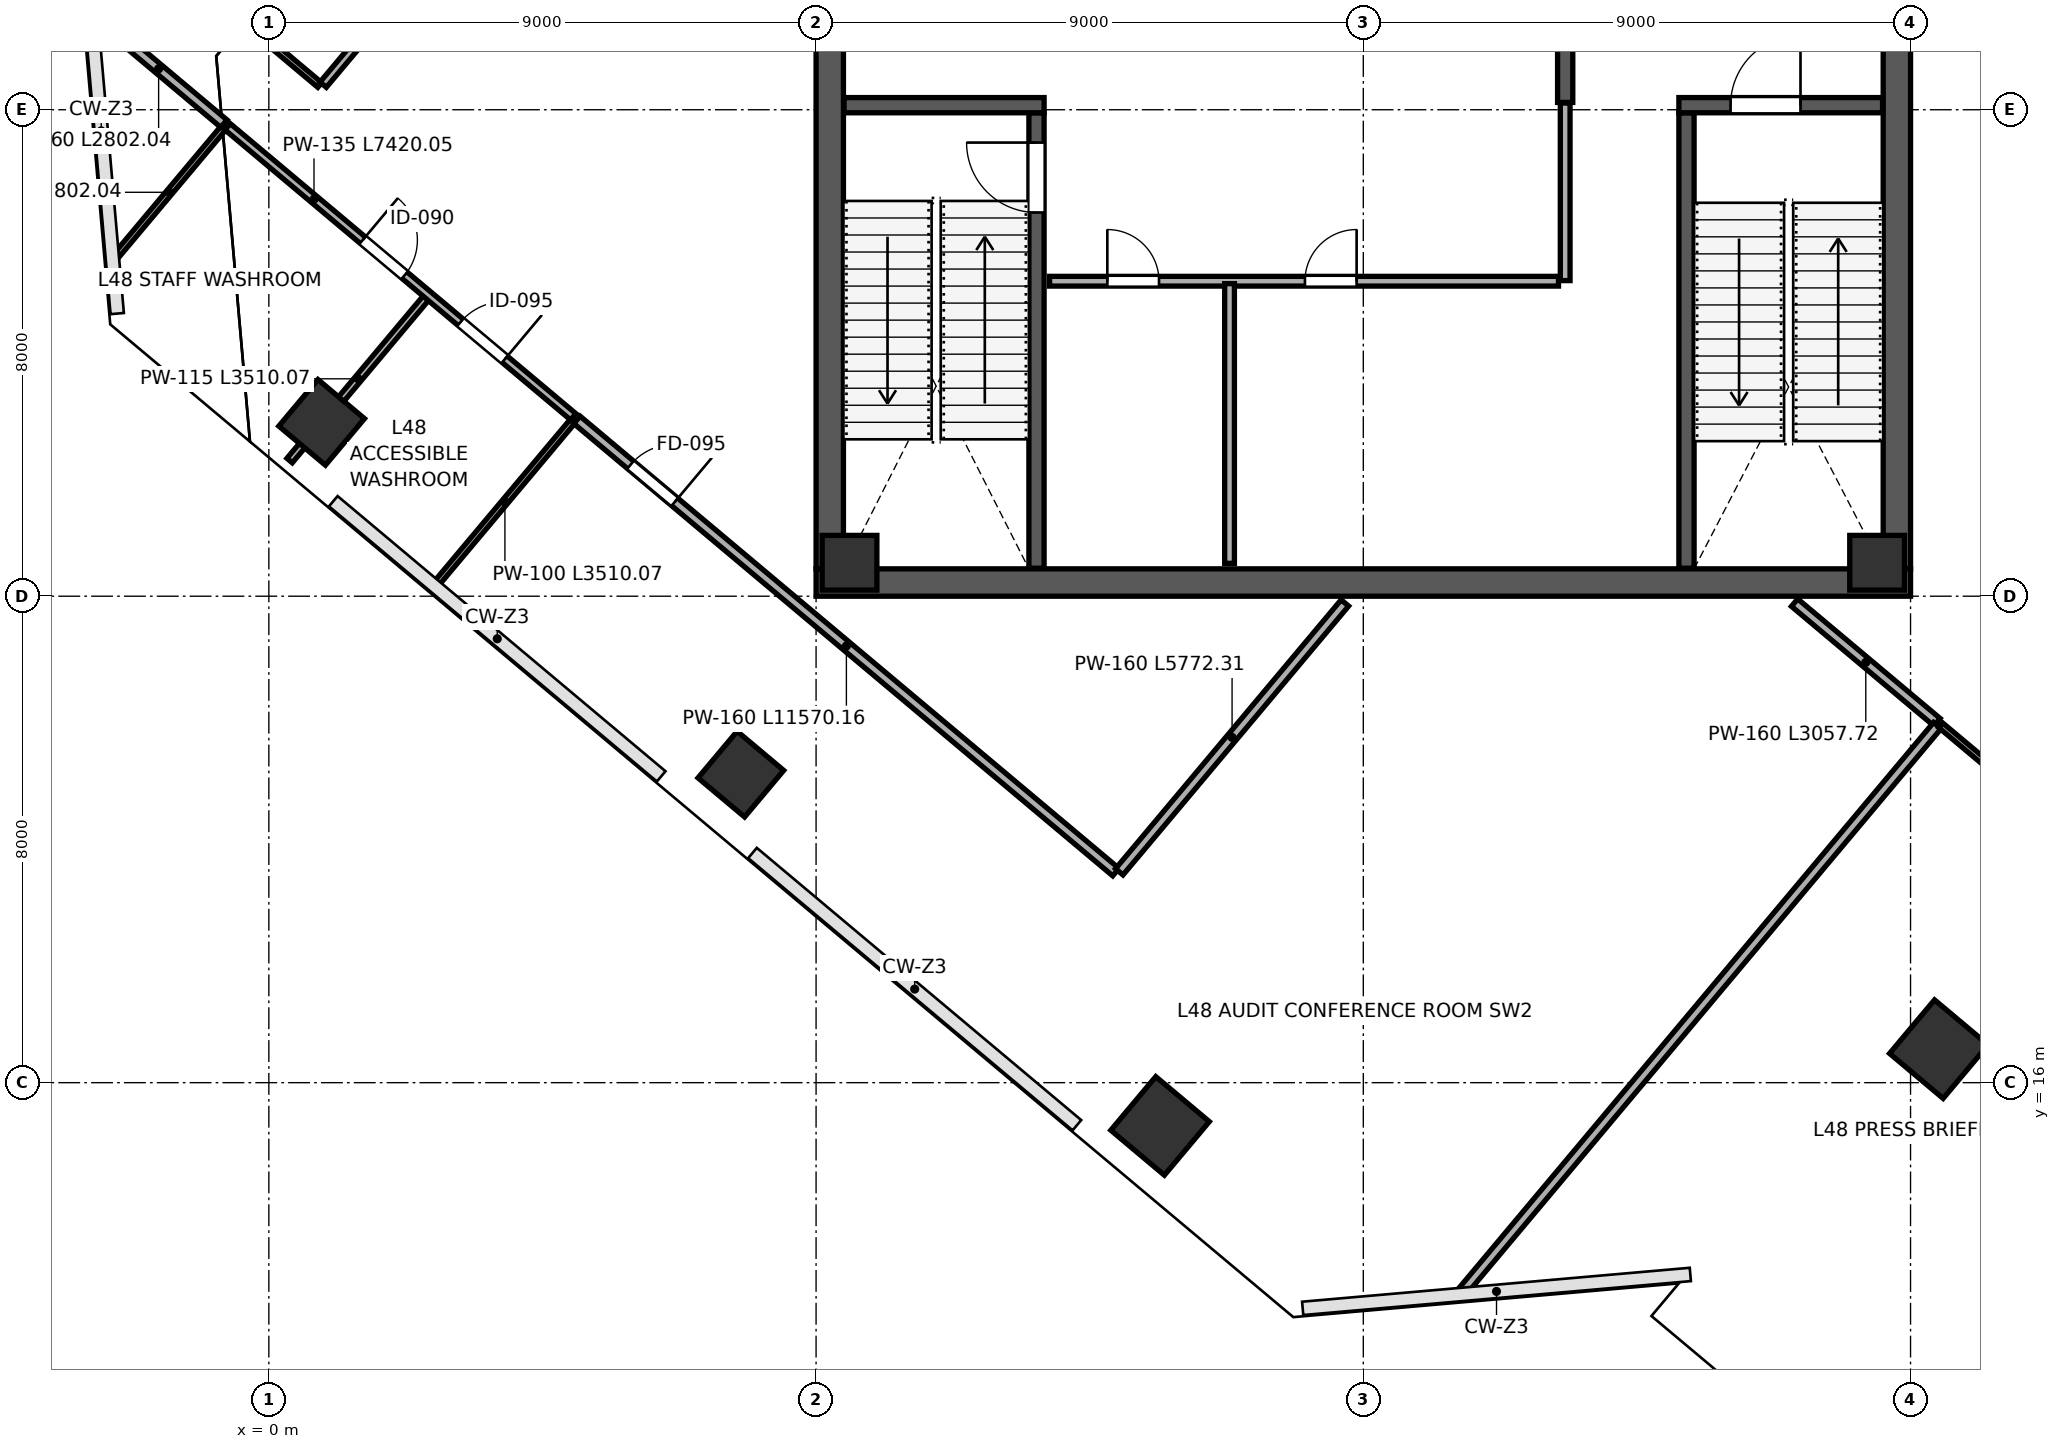
"""IFC4 building model, lengths in metres.
Left out: names, types, materials, properties, quantities, classifications, styles, units other than length and angle.
Written with IfcOpenShell. Run it as: python <this file> out.ifc"""

import sys

from ifc_helpers import new_model, si_unit, direction, frame, frame_2d, origin, origin_2d, place, context, subcontext, project, spatial, rectangle, extrude, source, transform, mapped, element, fill, save


model = new_model("IFC4")
c1 = context("Model", 3, precision=1e-05, world=origin(), true_north=direction((0.0, 1.0)))
c2 = subcontext(c1, "Body", "Model", "MODEL_VIEW")
j1 = project(units=[si_unit("LENGTHUNIT", "METRE"), si_unit("PLANEANGLEUNIT", "RADIAN")], contexts=[c1])
p1 = place(None, origin())
s1 = spatial("IfcSite", under=j1, at=p1, CompositionType="ELEMENT")
p2 = place(p1, origin())
s2 = spatial("IfcBuilding", under=s1, at=p2, CompositionType="ELEMENT")
p3 = place(p2, frame((0.0, 0.0, 215.2)))
s3 = spatial("IfcBuildingStorey", under=s2, at=p3, CompositionType="ELEMENT", Elevation=215.2)
m1 = source(origin(), c2, "Body", "SweptSolid", [
    extrude(rectangle(XDim=0.9, YDim=0.9, at=origin_2d()), origin(), (0.0, 0.0, 1.0), 5.399),
])
for number, where, z_axis, x_axis in (
    (1, (9.55, 24.55, 0.001), (0.0, 0.0, 1.0), (1.0, 0.0, 0.0)),
    (2, (26.45, 24.55, 0.001), (0.0, 0.0, 1.0), (1.0, 0.0, 0.0)),
):
    element("IfcColumn", number, at=place(p3, frame(where, z_axis=z_axis, x_axis=x_axis)), inside=s3, PredefinedType="COLUMN", context=c2, shape_type="MappedRepresentation", body=[
        mapped(m1, transform((0.0, 0.0, 0.0), scale=1.0)),
    ])
m2 = source(origin(), c2, "Body", "SweptSolid", [
    extrude(rectangle(XDim=1.0, YDim=1.0, at=origin_2d()), origin(), (0.0, 0.0, 1.0), 5.399),
])
for number, where, z_axis, x_axis in (
    (3, (0.868, 26.859, 0.001), (0.0, 0.0, 1.0), (-0.766, 0.643, 0.0)),
    (4, (7.763, 21.074, 0.001), (0.0, 0.0, 1.0), (-0.766, 0.643, 0.0)),
):
    element("IfcColumn", number, at=place(p3, frame(where, z_axis=z_axis, x_axis=x_axis)), inside=s3, PredefinedType="COLUMN", context=c2, shape_type="MappedRepresentation", body=[
        mapped(m2, transform((0.0, 0.0, 0.0), scale=1.0)),
    ])
m3 = source(origin(), c2, "Body", "SweptSolid", [
    extrude(rectangle(XDim=1.15, YDim=1.15, at=origin_2d()), origin(), (0.0, 0.0, 1.0), 5.399),
])
p4 = place(p3, frame((14.657, 15.289, 0.001), z_axis=(0.0, 0.0, 1.0), x_axis=(-0.766044443119, 0.642787609687, 0.0)))
e5 = element("IfcColumn", 5, at=p4, inside=s3, PredefinedType="COLUMN", context=c2, shape_type="MappedRepresentation", body=[
    mapped(m3, transform((0.0, 0.0, 0.0), scale=1.0)),
])
m4 = source(origin(), c2, "Body", "SweptSolid", [
    extrude(rectangle(XDim=1.15, YDim=1.15, at=origin_2d()), origin(), (0.0, 0.0, 1.0), 5.399),
])
p5 = place(p3, frame((27.465, 16.551, 0.001), z_axis=(0.0, 0.0, 1.0), x_axis=(-0.766044443119, 0.642787609687, 0.0)))
e6 = element("IfcColumn", 6, at=p5, inside=s3, PredefinedType="COLUMN", context=c2, shape_type="MappedRepresentation", body=[
    mapped(m4, transform((0.0, 0.0, 0.0), scale=1.0)),
])
p6 = place(p3, frame((9.225, 24.45, 0.0), z_axis=(0.0, 0.0, 1.0), x_axis=(0.0, 1.0, 0.0)))
e7 = element("IfcWall", 7, at=p6, inside=s3, PredefinedType="SHEAR", context=c2, shape_type="SweptSolid", body=[
    extrude(rectangle(XDim=15.1, YDim=0.45, at=frame_2d((7.55, 0.0))), origin(), (0.0, 0.0, 1.0), 5.16),
])
p7 = place(p3, frame((26.775, 24.45, 0.0), z_axis=(0.0, 0.0, 1.0), x_axis=(0.0, 1.0, 0.0)))
e8 = element("IfcWall", 8, at=p7, inside=s3, PredefinedType="SHEAR", context=c2, shape_type="SweptSolid", body=[
    extrude(rectangle(XDim=15.1, YDim=0.45, at=frame_2d((7.55, 0.0))), origin(), (0.0, 0.0, 1.0), 5.16),
])
p8 = place(p7, frame((8.6, 0.0, 0.0)))
e9 = element("IfcOpeningElement", 9, at=p8, cuts=e8, PredefinedType="OPENING", context=c2, shape_type="SweptSolid", body=[
    extrude(rectangle(XDim=1.15, YDim=2.2, at=frame_2d((0.575, 1.1))), frame((0.0, 0.235, 0.0), z_axis=(0.0, -1.0, 0.0), x_axis=(1.0, 0.0, 0.0)), (0.0, 0.0, 1.0), 0.47),
])
p9 = place(p3, frame((9.0, 24.225, 0.0), z_axis=(0.0, 0.0, 1.0), x_axis=(1.0, 0.0, 0.0)))
e10 = element("IfcWall", 10, at=p9, inside=s3, PredefinedType="SHEAR", context=c2, shape_type="SweptSolid", body=[
    extrude(rectangle(XDim=18.0, YDim=0.45, at=frame_2d((9.0, 0.0))), origin(), (0.0, 0.0, 1.0), 5.16),
])
p10 = place(p3, frame((12.625, 24.46, 0.0), z_axis=(0.0, 0.0, 1.0), x_axis=(0.0, 1.0, 0.0)))
e11 = element("IfcWall", 11, at=p10, inside=s3, PredefinedType="SHEAR", context=c2, shape_type="SweptSolid", body=[
    extrude(rectangle(XDim=7.49, YDim=0.25, at=frame_2d((3.745, 0.0))), origin(), (0.0, 0.0, 1.0), 5.16),
])
p11 = place(p10, frame((5.85, 0.0, 0.0)))
e12 = element("IfcOpeningElement", 12, at=p11, cuts=e11, PredefinedType="OPENING", context=c2, shape_type="SweptSolid", body=[
    extrude(rectangle(XDim=1.15, YDim=2.2, at=frame_2d((0.575, 1.1))), frame((0.0, 0.135, 0.0), z_axis=(0.0, -1.0, 0.0), x_axis=(1.0, 0.0, 0.0)), (0.0, 0.0, 1.0), 0.27),
])
p12 = place(p3, frame((9.46, 32.075, 0.0), z_axis=(0.0, 0.0, 1.0), x_axis=(1.0, 0.0, 0.0)))
e13 = element("IfcWall", 13, at=p12, inside=s3, PredefinedType="SHEAR", context=c2, shape_type="SweptSolid", body=[
    extrude(rectangle(XDim=3.29, YDim=0.25, at=frame_2d((1.645, 0.0))), origin(), (0.0, 0.0, 1.0), 5.16),
])
p13 = place(p3, frame((23.315, 24.46, 0.0), z_axis=(0.0, 0.0, 1.0), x_axis=(0.0, 1.0, 0.0)))
e14 = element("IfcWall", 14, at=p13, inside=s3, PredefinedType="SHEAR", context=c2, shape_type="SweptSolid", body=[
    extrude(rectangle(XDim=7.49, YDim=0.25, at=frame_2d((3.745, 0.0))), origin(), (0.0, 0.0, 1.0), 5.16),
])
p14 = place(p3, frame((23.19, 32.075, 0.0), z_axis=(0.0, 0.0, 1.0), x_axis=(1.0, 0.0, 0.0)))
e15 = element("IfcWall", 15, at=p14, inside=s3, PredefinedType="SHEAR", context=c2, shape_type="SweptSolid", body=[
    extrude(rectangle(XDim=3.35, YDim=0.25, at=frame_2d((1.675, 0.0))), origin(), (0.0, 0.0, 1.0), 5.16),
])
p15 = place(p14, frame((0.85, 0.0, 0.0)))
e16 = element("IfcOpeningElement", 16, at=p15, cuts=e15, PredefinedType="OPENING", context=c2, shape_type="SweptSolid", body=[
    extrude(rectangle(XDim=1.15, YDim=2.2, at=frame_2d((0.575, 1.1))), frame((0.0, 0.135, 0.0), z_axis=(0.0, -1.0, 0.0), x_axis=(1.0, 0.0, 0.0)), (0.0, 0.0, 1.0), 0.27),
])
p16 = place(p3, frame((21.32, 32.12, 0.0), z_axis=(0.0, 0.0, 1.0), x_axis=(0.0, 1.0, 0.0)))
e17 = element("IfcWall", 17, at=p16, inside=s3, PredefinedType="SHEAR", context=c2, shape_type="SweptSolid", body=[
    extrude(rectangle(XDim=7.42, YDim=0.25, at=frame_2d((3.71, 0.0))), origin(), (0.0, 0.0, 1.0), 5.16),
])
p17 = place(p16, frame((1.4, 0.0, 0.0)))
e18 = element("IfcOpeningElement", 18, at=p17, cuts=e17, PredefinedType="OPENING", context=c2, shape_type="SweptSolid", body=[
    extrude(rectangle(XDim=1.15, YDim=2.2, at=frame_2d((0.575, 1.1))), frame((0.0, 0.135, 0.0), z_axis=(0.0, -1.0, 0.0), x_axis=(1.0, 0.0, 0.0)), (0.0, 0.0, 1.0), 0.27),
])
p18 = place(p3, frame((12.84, 29.18, 0.0), z_axis=(0.0, 0.0, 1.0), x_axis=(1.0, 0.0, 0.0)))
e19 = element("IfcWall", 19, at=p18, inside=s3, PredefinedType="PARTITIONING", context=c2, shape_type="SweptSolid", body=[
    extrude(rectangle(XDim=8.37, YDim=0.16, at=frame_2d((4.185, 0.0))), origin(), (0.0, 0.0, 1.0), 5.16),
])
p19 = place(p18, frame((0.95, 0.0, 0.0)))
e20 = element("IfcOpeningElement", 20, at=p19, cuts=e19, PredefinedType="OPENING", context=c2, shape_type="SweptSolid", body=[
    extrude(rectangle(XDim=0.85, YDim=2.1, at=frame_2d((0.425, 1.05))), frame((0.0, 0.09, 0.0), z_axis=(0.0, -1.0, 0.0), x_axis=(1.0, 0.0, 0.0)), (0.0, 0.0, 1.0), 0.18),
])
p20 = place(p18, frame((4.2, 0.0, 0.0)))
e21 = element("IfcOpeningElement", 21, at=p20, cuts=e19, PredefinedType="OPENING", context=c2, shape_type="SweptSolid", body=[
    extrude(rectangle(XDim=0.85, YDim=2.1, at=frame_2d((0.425, 1.05))), frame((0.0, 0.09, 0.0), z_axis=(0.0, -1.0, 0.0), x_axis=(1.0, 0.0, 0.0)), (0.0, 0.0, 1.0), 0.18),
])
p21 = place(p3, frame((15.8, 24.54, 0.0), z_axis=(0.0, 0.0, 1.0), x_axis=(0.0, 1.0, 0.0)))
e22 = element("IfcWall", 22, at=p21, inside=s3, PredefinedType="PARTITIONING", context=c2, shape_type="SweptSolid", body=[
    extrude(rectangle(XDim=4.6, YDim=0.16, at=frame_2d((2.3, 0.0))), origin(), (0.0, 0.0, 1.0), 5.16),
])
p22 = place(p3, frame((21.32, 29.19, 0.0), z_axis=(0.0, 0.0, 1.0), x_axis=(0.0, 1.0, 0.0)))
e23 = element("IfcWall", 23, at=p22, inside=s3, PredefinedType="PARTITIONING", context=c2, shape_type="SweptSolid", body=[
    extrude(rectangle(XDim=2.92, YDim=0.16, at=frame_2d((1.46, 0.0))), origin(), (0.0, 0.0, 1.0), 5.16),
])
p23 = place(p3, frame((-2.536, 29.569, 0.0), z_axis=(0.0, 0.0, 1.0), x_axis=(0.642777228426, 0.766053153911, 0.0)))
e24 = element("IfcWall", 24, at=p23, inside=s3, PredefinedType="PARTITIONING", context=c2, shape_type="SweptSolid", body=[
    extrude(rectangle(XDim=2.802, YDim=0.1, at=frame_2d((1.401, 0.0))), origin(), (0.0, 0.0, 1.0), 5.16),
])
p24 = place(p3, frame((-2.886, 33.573, 0.0), z_axis=(0.0, 0.0, 1.0), x_axis=(0.766060058075, -0.642769000048, 0.0)))
e25 = element("IfcWall", 25, at=p24, inside=s3, PredefinedType="PARTITIONING", context=c2, shape_type="SweptSolid", body=[
    extrude(rectangle(XDim=2.802, YDim=0.16, at=frame_2d((1.401, 0.0))), origin(), (0.0, 0.0, 1.0), 5.16),
])
p25 = place(p3, frame((0.341, 26.231, 0.0), z_axis=(0.0, 0.0, 1.0), x_axis=(0.642794003744, 0.766039077822, 0.0)))
e26 = element("IfcWall", 26, at=p25, inside=s3, PredefinedType="PARTITIONING", context=c2, shape_type="SweptSolid", body=[
    extrude(rectangle(XDim=3.51, YDim=0.115, at=frame_2d((1.755, 0.0))), origin(), (0.0, 0.0, 1.0), 4.395),
])
p26 = place(p3, frame((2.754, 24.206, 0.0), z_axis=(0.0, 0.0, 1.0), x_axis=(0.642753187144, 0.766073325744, 0.0)))
e27 = element("IfcWall", 27, at=p26, inside=s3, PredefinedType="PARTITIONING", context=c2, shape_type="SweptSolid", body=[
    extrude(rectangle(XDim=3.51, YDim=0.1, at=frame_2d((1.755, 0.0))), origin(), (0.0, 0.0, 1.0), 4.395),
])
p27 = place(p3, frame((-0.678, 31.721, 0.0), z_axis=(0.0, 0.0, 1.0), x_axis=(0.766043108328, -0.642789200425, 0.0)))
e28 = element("IfcWall", 28, at=p27, inside=s3, PredefinedType="PARTITIONING", context=c2, shape_type="SweptSolid", body=[
    extrude(rectangle(XDim=7.42, YDim=0.135, at=frame_2d((3.71, 0.0))), origin(), (0.0, 0.0, 1.0), 5.16),
])
p28 = place(p27, frame((2.9, 0.0, 0.0)))
e29 = element("IfcOpeningElement", 29, at=p28, cuts=e28, PredefinedType="OPENING", context=c2, shape_type="SweptSolid", body=[
    extrude(rectangle(XDim=0.9, YDim=2.15, at=frame_2d((0.45, 1.075))), frame((0.0, 0.078, 0.0), z_axis=(0.0, -1.0, 0.0), x_axis=(1.0, 0.0, 0.0)), (0.0, 0.0, 1.0), 0.155),
])
p29 = place(p27, frame((5.0, 0.0, 0.0)))
e30 = element("IfcOpeningElement", 30, at=p29, cuts=e28, PredefinedType="OPENING", context=c2, shape_type="SweptSolid", body=[
    extrude(rectangle(XDim=0.95, YDim=2.15, at=frame_2d((0.475, 1.075))), frame((0.0, 0.078, 0.0), z_axis=(0.0, -1.0, 0.0), x_axis=(1.0, 0.0, 0.0)), (0.0, 0.0, 1.0), 0.155),
])
p30 = place(p3, frame((5.067, 26.9, 0.0), z_axis=(0.0, 0.0, 1.0), x_axis=(0.766051435801, -0.64277927604, 0.0)))
e31 = element("IfcWall", 31, at=p30, inside=s3, PredefinedType="PARTITIONING", context=c2, shape_type="SweptSolid", body=[
    extrude(rectangle(XDim=11.57, YDim=0.16, at=frame_2d((5.785, 0.0))), origin(), (0.0, 0.0, 1.0), 5.16),
])
p31 = place(p30, frame((1.15, 0.0, 0.0)))
e32 = element("IfcOpeningElement", 32, at=p31, cuts=e31, PredefinedType="OPENING", context=c2, shape_type="SweptSolid", body=[
    extrude(rectangle(XDim=0.95, YDim=2.15, at=frame_2d((0.475, 1.075))), frame((0.0, 0.09, 0.0), z_axis=(0.0, -1.0, 0.0), x_axis=(1.0, 0.0, 0.0)), (0.0, 0.0, 1.0), 0.18),
])
p32 = place(p3, frame((13.987, 19.468, 0.0), z_axis=(0.0, 0.0, 1.0), x_axis=(0.642768435417, 0.766060531833, 0.0)))
e33 = element("IfcWall", 33, at=p32, inside=s3, PredefinedType="PARTITIONING", context=c2, shape_type="SweptSolid", body=[
    extrude(rectangle(XDim=5.772, YDim=0.16, at=frame_2d((2.886, 0.0))), origin(), (0.0, 0.0, 1.0), 5.16),
])
p33 = place(p3, frame((25.093, 23.894, 0.0), z_axis=(0.0, 0.0, 1.0), x_axis=(0.76609008417, -0.642733212878, 0.0)))
e34 = element("IfcWall", 34, at=p33, inside=s3, PredefinedType="PARTITIONING", context=c2, shape_type="SweptSolid", body=[
    extrude(rectangle(XDim=3.058, YDim=0.16, at=frame_2d((1.529, 0.0))), origin(), (0.0, 0.0, 1.0), 5.16),
])
p34 = place(p3, frame((-2.556, 35.254, 0.0), z_axis=(0.0, 0.0, 1.0), x_axis=(0.76603046424, -0.642804268698, 0.0)))
e35 = element("IfcWall", 35, at=p34, inside=s3, PredefinedType="PARTITIONING", context=c2, shape_type="SweptSolid", body=[
    extrude(rectangle(XDim=4.43, YDim=0.1, at=frame_2d((2.215, 0.0))), origin(), (0.0, 0.0, 1.0), 5.16),
])
p35 = place(p3, frame((0.894, 32.412, 0.0), z_axis=(0.0, 0.0, 1.0), x_axis=(0.64277673271, 0.766053569854, 0.0)))
e36 = element("IfcWall", 36, at=p35, inside=s3, PredefinedType="PARTITIONING", context=c2, shape_type="SweptSolid", body=[
    extrude(rectangle(XDim=24.06, YDim=0.135, at=frame_2d((12.03, 0.0))), origin(), (0.0, 0.0, 1.0), 5.16),
])
p36 = place(p35, frame((2.2, 0.0, 0.0)))
e37 = element("IfcOpeningElement", 37, at=p36, cuts=e36, PredefinedType="OPENING", context=c2, shape_type="SweptSolid", body=[
    extrude(rectangle(XDim=0.95, YDim=2.15, at=frame_2d((0.475, 1.075))), frame((0.0, 0.078, 0.0), z_axis=(0.0, -1.0, 0.0), x_axis=(1.0, 0.0, 0.0)), (0.0, 0.0, 1.0), 0.155),
])
p37 = place(p3, frame((19.622, 12.556, 0.0), z_axis=(0.0, 0.0, 1.0), x_axis=(0.642789011194, 0.766043267112, 0.0)))
e38 = element("IfcWall", 38, at=p37, inside=s3, PredefinedType="PARTITIONING", context=c2, shape_type="SweptSolid", body=[
    extrude(rectangle(XDim=12.162, YDim=0.16, at=frame_2d((6.081, 0.0))), origin(), (0.0, 0.0, 1.0), 5.16),
])
p38 = place(p3, frame((27.496, 21.877, 0.0), z_axis=(0.0, 0.0, 1.0), x_axis=(0.766053586218, -0.642776713208, 0.0)))
e39 = element("IfcWall", 39, at=p38, inside=s3, PredefinedType="PARTITIONING", context=c2, shape_type="SweptSolid", body=[
    extrude(rectangle(XDim=10.12, YDim=0.1, at=frame_2d((5.06, 0.0))), origin(), (0.0, 0.0, 1.0), 5.16),
])
p39 = place(p38, frame((1.05, 0.0, 0.0)))
e40 = element("IfcOpeningElement", 40, at=p39, cuts=e39, PredefinedType="OPENING", context=c2, shape_type="SweptSolid", body=[
    extrude(rectangle(XDim=0.95, YDim=2.15, at=frame_2d((0.475, 1.075))), frame((0.0, 0.06, 0.0), z_axis=(0.0, -1.0, 0.0), x_axis=(1.0, 0.0, 0.0)), (0.0, 0.0, 1.0), 0.12),
])
m5 = source(origin(), c2, "Body", "SweptSolid", [
    extrude(rectangle(XDim=1.15, YDim=2.2, at=frame_2d((0.575, 1.1))), frame((0.0, 0.025, 0.0), z_axis=(0.0, -1.0, 0.0), x_axis=(1.0, 0.0, 0.0)), (0.0, 0.0, 1.0), 0.05),
])
p40 = place(p11, origin())
e41 = element("IfcDoor", 41, at=p40, inside=s3, OperationType="SINGLE_SWING_RIGHT", PredefinedType="DOOR", context=c2, shape_type="MappedRepresentation", body=[
    mapped(m5, transform((0.0, 0.0, 0.0), scale=1.0)),
])
fill(e12, e41)
p41 = place(p15, origin())
e42 = element("IfcDoor", 42, at=p41, inside=s3, OperationType="SINGLE_SWING_RIGHT", PredefinedType="DOOR", context=c2, shape_type="MappedRepresentation", body=[
    mapped(m5, transform((0.0, 0.0, 0.0), scale=1.0)),
])
fill(e16, e42)
m6 = source(origin(), c2, "Body", "SweptSolid", [
    extrude(rectangle(XDim=0.85, YDim=2.1, at=frame_2d((0.425, 1.05))), frame((0.0, 0.025, 0.0), z_axis=(0.0, -1.0, 0.0), x_axis=(1.0, 0.0, 0.0)), (0.0, 0.0, 1.0), 0.05),
])
p42 = place(p19, origin())
e43 = element("IfcDoor", 43, at=p42, inside=s3, OperationType="SINGLE_SWING_LEFT", PredefinedType="DOOR", context=c2, shape_type="MappedRepresentation", body=[
    mapped(m6, transform((0.0, 0.0, 0.0), scale=1.0)),
])
fill(e20, e43)
p43 = place(p20, origin())
e44 = element("IfcDoor", 44, at=p43, inside=s3, OperationType="SINGLE_SWING_RIGHT", PredefinedType="DOOR", context=c2, shape_type="MappedRepresentation", body=[
    mapped(m6, transform((0.0, 0.0, 0.0), scale=1.0)),
])
fill(e21, e44)
m7 = source(origin(), c2, "Body", "SweptSolid", [
    extrude(rectangle(XDim=0.9, YDim=2.15, at=frame_2d((0.45, 1.075))), frame((0.0, 0.025, 0.0), z_axis=(0.0, -1.0, 0.0), x_axis=(1.0, 0.0, 0.0)), (0.0, 0.0, 1.0), 0.05),
])
p44 = place(p28, origin())
e45 = element("IfcDoor", 45, at=p44, inside=s3, OperationType="SINGLE_SWING_LEFT", PredefinedType="DOOR", context=c2, shape_type="MappedRepresentation", body=[
    mapped(m7, transform((0.0, 0.0, 0.0), scale=1.0)),
])
fill(e29, e45)
m8 = source(origin(), c2, "Body", "SweptSolid", [
    extrude(rectangle(XDim=0.95, YDim=2.15, at=frame_2d((0.475, 1.075))), frame((0.0, 0.025, 0.0), z_axis=(0.0, -1.0, 0.0), x_axis=(1.0, 0.0, 0.0)), (0.0, 0.0, 1.0), 0.05),
])
p45 = place(p29, origin())
e46 = element("IfcDoor", 46, at=p45, inside=s3, OperationType="SINGLE_SWING_RIGHT", PredefinedType="DOOR", context=c2, shape_type="MappedRepresentation", body=[
    mapped(m8, transform((0.0, 0.0, 0.0), scale=1.0)),
])
fill(e30, e46)
m9 = source(origin(), c2, "Body", "SweptSolid", [
    extrude(rectangle(XDim=0.95, YDim=2.15, at=frame_2d((0.475, 1.075))), frame((0.0, 0.025, 0.0), z_axis=(0.0, -1.0, 0.0), x_axis=(1.0, 0.0, 0.0)), (0.0, 0.0, 1.0), 0.05),
])
p46 = place(p31, origin())
e47 = element("IfcDoor", 47, at=p46, inside=s3, OperationType="SINGLE_SWING_RIGHT", PredefinedType="DOOR", context=c2, shape_type="MappedRepresentation", body=[
    mapped(m9, transform((0.0, 0.0, 0.0), scale=1.0)),
])
fill(e32, e47)
save(model, sys.argv[1])
